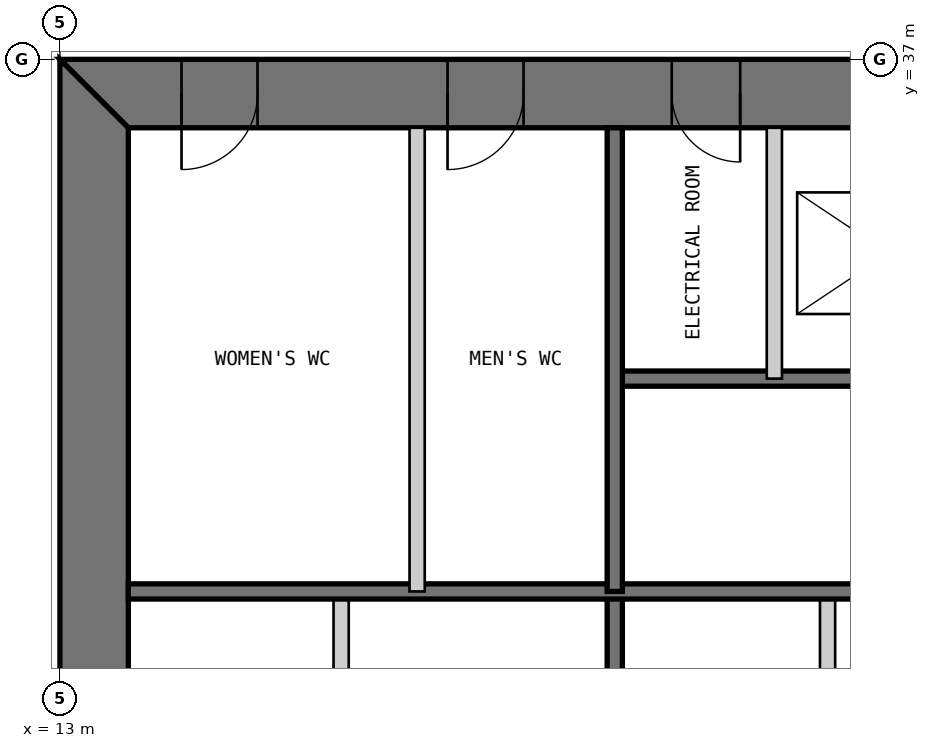
"""IFC4 building model, lengths in metres.
Left out: names, types, materials, properties, quantities, classifications, styles, units other than length and angle.
Written with IfcOpenShell. Run it as: python <this file> out.ifc"""

import sys

from ifc_helpers import new_model, si_unit, direction, frame, frame_2d, origin, place, context, subcontext, project, spatial, polyline, rectangle, outline, extrude, element, fill, save


model = new_model("IFC4")
c1 = context("Model", 3, precision=1e-05, world=origin(), true_north=direction((0.0, 1.0)))
c2 = subcontext(c1, "Body", "Model", "MODEL_VIEW")
j1 = project(units=[si_unit("LENGTHUNIT", "METRE"), si_unit("PLANEANGLEUNIT", "RADIAN")], contexts=[c1])
p1 = place(None, origin())
s1 = spatial("IfcSite", under=j1, at=p1, CompositionType="ELEMENT")
p2 = place(p1, origin())
s2 = spatial("IfcBuilding", under=s1, at=p2, CompositionType="ELEMENT")
p3 = place(p2, frame((0.0, 0.0, 276.4)))
s3 = spatial("IfcBuildingStorey", under=s2, at=p3, CompositionType="ELEMENT", Elevation=276.4)
p4 = place(p3, frame((37.0, 36.55, 0.0), z_axis=(0.0, 0.0, 1.0), x_axis=(-1.0, 0.0, 0.0)))
e1 = element("IfcWall", 1, at=p4, inside=s3, PredefinedType="SHEAR", context=c2, shape_type="SweptSolid", body=[
    extrude(outline(polyline([(0.0, -0.45), (24.0, -0.45), (23.1, 0.45), (0.9, 0.45), (0.0, -0.45)])), origin(), (0.0, 0.0, 1.0), 3.4),
])
p5 = place(p4, frame((4.9, 0.0, 0.0)))
e2 = element("IfcOpeningElement", 2, at=p5, cuts=e1, PredefinedType="OPENING", context=c2, shape_type="SweptSolid", body=[
    extrude(rectangle(XDim=1.0, YDim=2.2, at=frame_2d((0.5, 1.1))), frame((0.0, 0.46, 0.0), z_axis=(0.0, -1.0, 0.0), x_axis=(1.0, 0.0, 0.0)), (0.0, 0.0, 1.0), 0.92),
])
p6 = place(p4, frame((8.9, 0.0, 0.0)))
e3 = element("IfcOpeningElement", 3, at=p6, cuts=e1, PredefinedType="OPENING", context=c2, shape_type="SweptSolid", body=[
    extrude(rectangle(XDim=1.1, YDim=2.2, at=frame_2d((0.55, 1.1))), frame((0.0, 0.46, 0.0), z_axis=(0.0, -1.0, 0.0), x_axis=(1.0, 0.0, 0.0)), (0.0, 0.0, 1.0), 0.92),
])
p7 = place(p4, frame((15.05, 0.0, 0.0)))
e4 = element("IfcOpeningElement", 4, at=p7, cuts=e1, PredefinedType="OPENING", context=c2, shape_type="SweptSolid", body=[
    extrude(rectangle(XDim=0.9, YDim=2.2, at=frame_2d((0.45, 1.1))), frame((0.0, 0.46, 0.0), z_axis=(0.0, -1.0, 0.0), x_axis=(1.0, 0.0, 0.0)), (0.0, 0.0, 1.0), 0.92),
])
p8 = place(p4, frame((17.9, 0.0, 0.0)))
e5 = element("IfcOpeningElement", 5, at=p8, cuts=e1, PredefinedType="OPENING", context=c2, shape_type="SweptSolid", body=[
    extrude(rectangle(XDim=1.0, YDim=2.2, at=frame_2d((0.5, 1.1))), frame((0.0, 0.46, 0.0), z_axis=(0.0, -1.0, 0.0), x_axis=(1.0, 0.0, 0.0)), (0.0, 0.0, 1.0), 0.92),
])
p9 = place(p4, frame((21.4, 0.0, 0.0)))
e6 = element("IfcOpeningElement", 6, at=p9, cuts=e1, PredefinedType="OPENING", context=c2, shape_type="SweptSolid", body=[
    extrude(rectangle(XDim=1.0, YDim=2.2, at=frame_2d((0.5, 1.1))), frame((0.0, 0.46, 0.0), z_axis=(0.0, -1.0, 0.0), x_axis=(1.0, 0.0, 0.0)), (0.0, 0.0, 1.0), 0.92),
])
p10 = place(p3, frame((13.45, 36.1, 0.0), z_axis=(0.0, 0.0, 1.0), x_axis=(0.0, -1.0, 0.0)))
e7 = element("IfcWall", 7, at=p10, inside=s3, PredefinedType="SHEAR", context=c2, shape_type="SweptSolid", body=[
    extrude(outline(polyline([(-0.9, -0.45), (23.1, -0.45), (22.2, 0.45), (0.0, 0.45), (-0.9, -0.45)])), origin(), (0.0, 0.0, 1.0), 3.4),
])
p11 = place(p10, frame((20.2, 0.0, 0.0)))
e8 = element("IfcOpeningElement", 8, at=p11, cuts=e7, PredefinedType="OPENING", context=c2, shape_type="SweptSolid", body=[
    extrude(rectangle(XDim=1.0, YDim=2.2, at=frame_2d((0.5, 1.1))), frame((0.0, 0.46, 0.0), z_axis=(0.0, -1.0, 0.0), x_axis=(1.0, 0.0, 0.0)), (0.0, 0.0, 1.0), 0.92),
])
p12 = place(p10, frame((17.25, 0.0, 0.0)))
e9 = element("IfcOpeningElement", 9, at=p12, cuts=e7, PredefinedType="OPENING", context=c2, shape_type="SweptSolid", body=[
    extrude(rectangle(XDim=0.9, YDim=2.2, at=frame_2d((0.45, 1.1))), frame((0.0, 0.46, 0.0), z_axis=(0.0, -1.0, 0.0), x_axis=(1.0, 0.0, 0.0)), (0.0, 0.0, 1.0), 0.92),
])
p13 = place(p3, frame((16.7, 13.9, 0.0), z_axis=(0.0, 0.0, 1.0), x_axis=(0.0, 1.0, 0.0)))
e10 = element("IfcWall", 10, at=p13, inside=s3, PredefinedType="PARTITIONING", context=c2, shape_type="SweptSolid", body=[
    extrude(rectangle(XDim=16.1, YDim=0.2, at=frame_2d((8.05, 0.0))), origin(), (0.0, 0.0, 1.0), 3.2),
])
p14 = place(p13, frame((7.4, 0.0, 0.0)))
e11 = element("IfcOpeningElement", 11, at=p14, cuts=e10, PredefinedType="OPENING", context=c2, shape_type="SweptSolid", body=[
    extrude(rectangle(XDim=0.9, YDim=2.2, at=frame_2d((0.45, 1.1))), frame((0.0, 0.11, 0.0), z_axis=(0.0, -1.0, 0.0), x_axis=(1.0, 0.0, 0.0)), (0.0, 0.0, 1.0), 0.22),
])
p15 = place(p13, frame((12.4, 0.0, 0.0)))
e12 = element("IfcOpeningElement", 12, at=p15, cuts=e10, PredefinedType="OPENING", context=c2, shape_type="SweptSolid", body=[
    extrude(rectangle(XDim=0.9, YDim=2.2, at=frame_2d((0.45, 1.1))), frame((0.0, 0.11, 0.0), z_axis=(0.0, -1.0, 0.0), x_axis=(1.0, 0.0, 0.0)), (0.0, 0.0, 1.0), 0.22),
])
p16 = place(p3, frame((20.3, 13.9, 0.0), z_axis=(0.0, 0.0, 1.0), x_axis=(0.0, 1.0, 0.0)))
e13 = element("IfcWall", 13, at=p16, inside=s3, PredefinedType="SOLIDWALL", context=c2, shape_type="SweptSolid", body=[
    extrude(rectangle(XDim=16.1, YDim=0.2, at=frame_2d((8.05, 0.0))), origin(), (0.0, 0.0, 1.0), 3.2),
])
p17 = place(p16, frame((8.4, 0.0, 0.0)))
e14 = element("IfcOpeningElement", 14, at=p17, cuts=e13, PredefinedType="OPENING", context=c2, shape_type="SweptSolid", body=[
    extrude(rectangle(XDim=0.9, YDim=2.2, at=frame_2d((0.45, 1.1))), frame((0.0, 0.11, 0.0), z_axis=(0.0, -1.0, 0.0), x_axis=(1.0, 0.0, 0.0)), (0.0, 0.0, 1.0), 0.22),
])
p18 = place(p16, frame((13.4, 0.0, 0.0)))
e15 = element("IfcOpeningElement", 15, at=p18, cuts=e13, PredefinedType="OPENING", context=c2, shape_type="SweptSolid", body=[
    extrude(rectangle(XDim=0.9, YDim=2.2, at=frame_2d((0.45, 1.1))), frame((0.0, 0.11, 0.0), z_axis=(0.0, -1.0, 0.0), x_axis=(1.0, 0.0, 0.0)), (0.0, 0.0, 1.0), 0.22),
])
p19 = place(p3, frame((23.1, 20.0, 0.0), z_axis=(0.0, 0.0, 1.0), x_axis=(0.0, 1.0, 0.0)))
e16 = element("IfcWall", 16, at=p19, inside=s3, PredefinedType="PARTITIONING", context=c2, shape_type="SweptSolid", body=[
    extrude(rectangle(XDim=10.0, YDim=0.2, at=frame_2d((5.0, 0.0))), origin(), (0.0, 0.0, 1.0), 3.2),
])
p20 = place(p3, frame((29.7, 32.8, 0.0), z_axis=(0.0, 0.0, 1.0), x_axis=(-1.0, 0.0, 0.0)))
e17 = element("IfcWall", 17, at=p20, inside=s3, PredefinedType="SOLIDWALL", context=c2, shape_type="SweptSolid", body=[
    extrude(rectangle(XDim=9.4, YDim=0.2, at=frame_2d((4.7, 0.0))), origin(), (0.0, 0.0, 1.0), 3.2),
])
p21 = place(p20, frame((0.25, 0.0, 0.0)))
e18 = element("IfcOpeningElement", 18, at=p21, cuts=e17, PredefinedType="OPENING", context=c2, shape_type="SweptSolid", body=[
    extrude(rectangle(XDim=1.0, YDim=2.2, at=frame_2d((0.5, 1.1))), frame((0.0, 0.11, 0.0), z_axis=(0.0, -1.0, 0.0), x_axis=(1.0, 0.0, 0.0)), (0.0, 0.0, 1.0), 0.22),
])
p22 = place(p3, frame((29.7, 30.0, 0.0), z_axis=(0.0, 0.0, 1.0), x_axis=(-1.0, 0.0, 0.0)))
e19 = element("IfcWall", 19, at=p22, inside=s3, PredefinedType="SOLIDWALL", context=c2, shape_type="SweptSolid", body=[
    extrude(rectangle(XDim=15.8, YDim=0.2, at=frame_2d((7.9, 0.0))), origin(), (0.0, 0.0, 1.0), 3.2),
])
p23 = place(p3, frame((22.4, 36.1, 0.0), z_axis=(0.0, 0.0, 1.0), x_axis=(0.0, -1.0, 0.0)))
e20 = element("IfcWall", 20, at=p23, inside=s3, PredefinedType="PARTITIONING", context=c2, shape_type="SweptSolid", body=[
    extrude(rectangle(XDim=3.3, YDim=0.2, at=frame_2d((1.65, 0.0))), origin(), (0.0, 0.0, 1.0), 3.2),
])
p24 = place(p3, frame((20.3, 36.1, 0.0), z_axis=(0.0, 0.0, 1.0), x_axis=(0.0, -1.0, 0.0)))
e21 = element("IfcWall", 21, at=p24, inside=s3, PredefinedType="SOLIDWALL", context=c2, shape_type="SweptSolid", body=[
    extrude(rectangle(XDim=6.1, YDim=0.2, at=frame_2d((3.05, 0.0))), origin(), (0.0, 0.0, 1.0), 3.2),
])
p25 = place(p3, frame((17.7, 36.1, 0.0), z_axis=(0.0, 0.0, 1.0), x_axis=(0.0, -1.0, 0.0)))
e22 = element("IfcWall", 22, at=p25, inside=s3, PredefinedType="PARTITIONING", context=c2, shape_type="SweptSolid", body=[
    extrude(rectangle(XDim=6.1, YDim=0.2, at=frame_2d((3.05, 0.0))), origin(), (0.0, 0.0, 1.0), 3.2),
])
p26 = place(p7, origin())
e23 = element("IfcDoor", 23, at=p26, inside=s3, OperationType="SINGLE_SWING_LEFT", PredefinedType="DOOR", context=c2, shape_type="SweptSolid", body=[
    extrude(rectangle(XDim=0.9, YDim=2.2, at=frame_2d((0.45, 1.1))), frame((0.0, 0.025, 0.0), z_axis=(0.0, -1.0, 0.0), x_axis=(1.0, 0.0, 0.0)), (0.0, 0.0, 1.0), 0.05),
    extrude(outline(polyline([(0.0, 0.0), (0.04, 0.0), (0.04, 2.16), (0.86, 2.16), (0.86, 0.0), (0.9, 0.0), (0.9, 2.2), (0.0, 2.2), (0.0, 0.0)])), frame((0.0, 0.3, 0.0), z_axis=(0.0, -1.0, 0.0), x_axis=(1.0, 0.0, 0.0)), (0.0, 0.0, 1.0), 0.6),
])
fill(e4, e23)
p27 = place(p8, origin())
e24 = element("IfcDoor", 24, at=p27, inside=s3, OperationType="SINGLE_SWING_RIGHT", PredefinedType="DOOR", context=c2, shape_type="SweptSolid", body=[
    extrude(rectangle(XDim=1.0, YDim=2.2, at=frame_2d((0.5, 1.1))), frame((0.0, 0.025, 0.0), z_axis=(0.0, -1.0, 0.0), x_axis=(1.0, 0.0, 0.0)), (0.0, 0.0, 1.0), 0.05),
    extrude(outline(polyline([(0.0, 0.0), (0.04, 0.0), (0.04, 2.16), (0.96, 2.16), (0.96, 0.0), (1.0, 0.0), (1.0, 2.2), (0.0, 2.2), (0.0, 0.0)])), frame((0.0, 0.3, 0.0), z_axis=(0.0, -1.0, 0.0), x_axis=(1.0, 0.0, 0.0)), (0.0, 0.0, 1.0), 0.6),
])
fill(e5, e24)
p28 = place(p9, origin())
e25 = element("IfcDoor", 25, at=p28, inside=s3, OperationType="SINGLE_SWING_RIGHT", PredefinedType="DOOR", context=c2, shape_type="SweptSolid", body=[
    extrude(rectangle(XDim=1.0, YDim=2.2, at=frame_2d((0.5, 1.1))), frame((0.0, 0.025, 0.0), z_axis=(0.0, -1.0, 0.0), x_axis=(1.0, 0.0, 0.0)), (0.0, 0.0, 1.0), 0.05),
    extrude(outline(polyline([(0.0, 0.0), (0.04, 0.0), (0.04, 2.16), (0.96, 2.16), (0.96, 0.0), (1.0, 0.0), (1.0, 2.2), (0.0, 2.2), (0.0, 0.0)])), frame((0.0, 0.3, 0.0), z_axis=(0.0, -1.0, 0.0), x_axis=(1.0, 0.0, 0.0)), (0.0, 0.0, 1.0), 0.6),
])
fill(e6, e25)
save(model, sys.argv[1])
